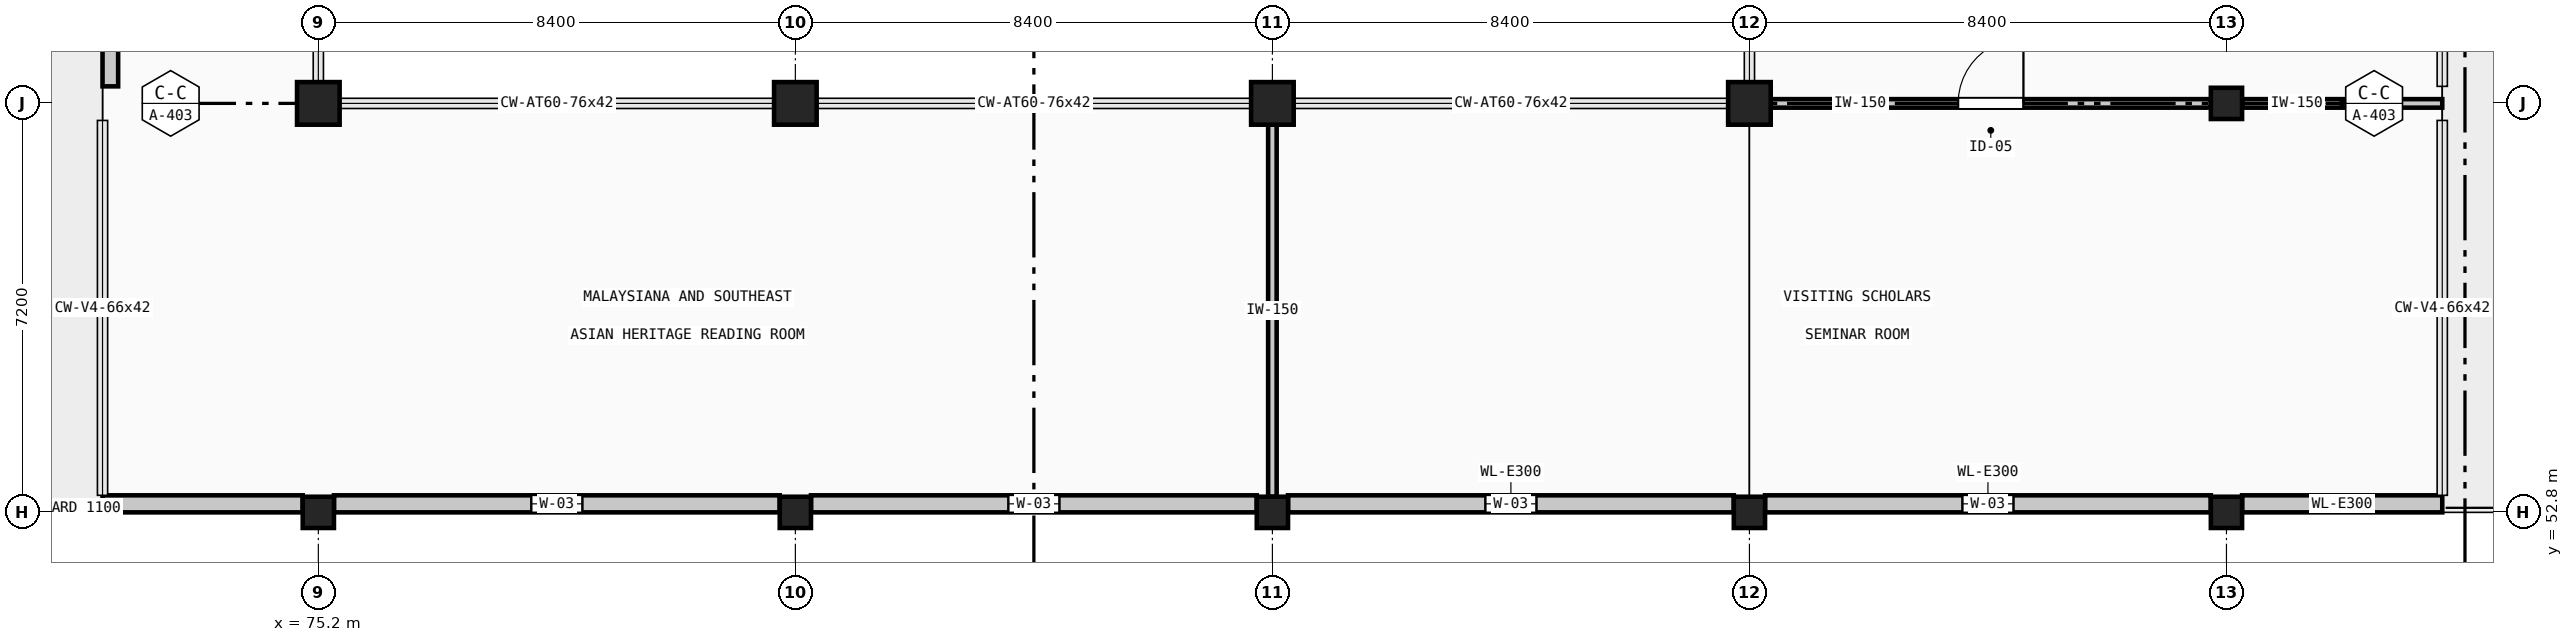
"""IFC4 building model, lengths in metres.
Left out: names, types, materials, properties, quantities, classifications, styles, units other than length and angle.
Written with IfcOpenShell. Run it as: python <this file> out.ifc"""

import sys

from ifc_helpers import new_model, si_unit, direction, frame, frame_2d, origin, origin_2d, place, context, subcontext, project, spatial, rectangle, circle, extrude, element, fill, save


model = new_model("IFC4")
c1 = context("Model", 3, precision=1e-05, world=origin(), true_north=direction((0.0, 1.0)))
c2 = subcontext(c1, "Body", "Model", "MODEL_VIEW")
j1 = project(units=[si_unit("LENGTHUNIT", "METRE"), si_unit("PLANEANGLEUNIT", "RADIAN")], contexts=[c1])
p1 = place(None, origin())
s1 = spatial("IfcSite", under=j1, at=p1, CompositionType="ELEMENT")
p2 = place(p1, origin())
s2 = spatial("IfcBuilding", under=s1, at=p2, CompositionType="ELEMENT")
p3 = place(p2, frame((0.0, 0.0, 23.36)))
s3 = spatial("IfcBuildingStorey", under=s2, at=p3, CompositionType="ELEMENT", Elevation=23.36)
p4 = place(p3, frame((75.2, 52.8, 0.0), z_axis=(0.0, 0.0, 1.0), x_axis=(1.0, 0.0, 0.0)))
e1 = element("IfcColumn", 1, at=p4, inside=s3, PredefinedType="COLUMN", context=c2, shape_type="SweptSolid", body=[
    extrude(rectangle(XDim=0.55, YDim=0.55, at=origin_2d()), origin(), (0.0, 0.0, 1.0), 4.48),
])
p5 = place(p3, frame((75.2, 60.0, 0.0), z_axis=(0.0, 0.0, 1.0), x_axis=(1.0, 0.0, 0.0)))
e2 = element("IfcColumn", 2, at=p5, inside=s3, PredefinedType="COLUMN", context=c2, shape_type="SweptSolid", body=[
    extrude(circle(Radius=0.375, at=origin_2d()), origin(), (0.0, 0.0, 1.0), 4.48),
])
p6 = place(p3, frame((83.6, 52.8, 0.0), z_axis=(0.0, 0.0, 1.0), x_axis=(1.0, 0.0, 0.0)))
e3 = element("IfcColumn", 3, at=p6, inside=s3, PredefinedType="COLUMN", context=c2, shape_type="SweptSolid", body=[
    extrude(rectangle(XDim=0.55, YDim=0.55, at=origin_2d()), origin(), (0.0, 0.0, 1.0), 4.48),
])
p7 = place(p3, frame((83.6, 60.0, 0.0), z_axis=(0.0, 0.0, 1.0), x_axis=(1.0, 0.0, 0.0)))
e4 = element("IfcColumn", 4, at=p7, inside=s3, PredefinedType="COLUMN", context=c2, shape_type="SweptSolid", body=[
    extrude(circle(Radius=0.375, at=origin_2d()), origin(), (0.0, 0.0, 1.0), 4.48),
])
p8 = place(p3, frame((92.0, 52.8, 0.0), z_axis=(0.0, 0.0, 1.0), x_axis=(1.0, 0.0, 0.0)))
e5 = element("IfcColumn", 5, at=p8, inside=s3, PredefinedType="COLUMN", context=c2, shape_type="SweptSolid", body=[
    extrude(rectangle(XDim=0.55, YDim=0.55, at=origin_2d()), origin(), (0.0, 0.0, 1.0), 4.48),
])
p9 = place(p3, frame((92.0, 60.0, 0.0), z_axis=(0.0, 0.0, 1.0), x_axis=(1.0, 0.0, 0.0)))
e6 = element("IfcColumn", 6, at=p9, inside=s3, PredefinedType="COLUMN", context=c2, shape_type="SweptSolid", body=[
    extrude(circle(Radius=0.375, at=origin_2d()), origin(), (0.0, 0.0, 1.0), 4.48),
])
p10 = place(p3, frame((100.4, 52.8, 0.0), z_axis=(0.0, 0.0, 1.0), x_axis=(1.0, 0.0, 0.0)))
e7 = element("IfcColumn", 7, at=p10, inside=s3, PredefinedType="COLUMN", context=c2, shape_type="SweptSolid", body=[
    extrude(rectangle(XDim=0.55, YDim=0.55, at=origin_2d()), origin(), (0.0, 0.0, 1.0), 4.48),
])
p11 = place(p3, frame((100.4, 60.0, 0.0), z_axis=(0.0, 0.0, 1.0), x_axis=(1.0, 0.0, 0.0)))
e8 = element("IfcColumn", 8, at=p11, inside=s3, PredefinedType="COLUMN", context=c2, shape_type="SweptSolid", body=[
    extrude(circle(Radius=0.375, at=origin_2d()), origin(), (0.0, 0.0, 1.0), 4.48),
])
for number, where, z_axis, x_axis in (
    (9, (108.8, 52.8, 0.0), (0.0, 0.0, 1.0), (1.0, 0.0, 0.0)),
    (10, (108.8, 60.0, 0.0), (0.0, 0.0, 1.0), (1.0, 0.0, 0.0)),
):
    element("IfcColumn", number, at=place(p3, frame(where, z_axis=z_axis, x_axis=x_axis)), inside=s3, PredefinedType="COLUMN", context=c2, shape_type="SweptSolid", body=[
        extrude(rectangle(XDim=0.55, YDim=0.55, at=origin_2d()), origin(), (0.0, 0.0, 1.0), 4.48),
    ])
p12 = place(p3, frame((112.6, 52.95, 0.0), z_axis=(0.0, 0.0, 1.0), x_axis=(-1.0, 0.0, 0.0)))
e11 = element("IfcWall", 11, at=p12, inside=s3, PredefinedType="SOLIDWALL", context=c2, shape_type="SweptSolid", body=[
    extrude(rectangle(XDim=3.525, YDim=0.3, at=frame_2d((1.763, 0.0))), origin(), (0.0, 0.0, 1.0), 4.255),
])
p13 = place(p3, frame((108.525, 52.95, 0.0), z_axis=(0.0, 0.0, 1.0), x_axis=(-1.0, 0.0, 0.0)))
e12 = element("IfcWall", 12, at=p13, inside=s3, PredefinedType="SOLIDWALL", context=c2, shape_type="SweptSolid", body=[
    extrude(rectangle(XDim=7.85, YDim=0.3, at=frame_2d((3.925, 0.0))), origin(), (0.0, 0.0, 1.0), 4.255),
])
p14 = place(p13, frame((3.475, 0.0, 0.9)))
e13 = element("IfcOpeningElement", 13, at=p14, cuts=e12, PredefinedType="OPENING", context=c2, shape_type="SweptSolid", body=[
    extrude(rectangle(XDim=0.9, YDim=2.1, at=frame_2d((0.45, 1.05))), frame((0.0, 0.16, 0.0), z_axis=(0.0, -1.0, 0.0), x_axis=(1.0, 0.0, 0.0)), (0.0, 0.0, 1.0), 0.32),
])
p15 = place(p3, frame((100.125, 52.95, 0.0), z_axis=(0.0, 0.0, 1.0), x_axis=(-1.0, 0.0, 0.0)))
e14 = element("IfcWall", 14, at=p15, inside=s3, PredefinedType="SOLIDWALL", context=c2, shape_type="SweptSolid", body=[
    extrude(rectangle(XDim=7.85, YDim=0.3, at=frame_2d((3.925, 0.0))), origin(), (0.0, 0.0, 1.0), 4.255),
])
p16 = place(p15, frame((3.475, 0.0, 0.9)))
e15 = element("IfcOpeningElement", 15, at=p16, cuts=e14, PredefinedType="OPENING", context=c2, shape_type="SweptSolid", body=[
    extrude(rectangle(XDim=0.9, YDim=2.1, at=frame_2d((0.45, 1.05))), frame((0.0, 0.16, 0.0), z_axis=(0.0, -1.0, 0.0), x_axis=(1.0, 0.0, 0.0)), (0.0, 0.0, 1.0), 0.32),
])
p17 = place(p3, frame((91.725, 52.95, 0.0), z_axis=(0.0, 0.0, 1.0), x_axis=(-1.0, 0.0, 0.0)))
e16 = element("IfcWall", 16, at=p17, inside=s3, PredefinedType="SOLIDWALL", context=c2, shape_type="SweptSolid", body=[
    extrude(rectangle(XDim=7.85, YDim=0.3, at=frame_2d((3.925, 0.0))), origin(), (0.0, 0.0, 1.0), 4.255),
])
p18 = place(p17, frame((3.475, 0.0, 0.9)))
e17 = element("IfcOpeningElement", 17, at=p18, cuts=e16, PredefinedType="OPENING", context=c2, shape_type="SweptSolid", body=[
    extrude(rectangle(XDim=0.9, YDim=2.1, at=frame_2d((0.45, 1.05))), frame((0.0, 0.16, 0.0), z_axis=(0.0, -1.0, 0.0), x_axis=(1.0, 0.0, 0.0)), (0.0, 0.0, 1.0), 0.32),
])
p19 = place(p3, frame((83.325, 52.95, 0.0), z_axis=(0.0, 0.0, 1.0), x_axis=(-1.0, 0.0, 0.0)))
e18 = element("IfcWall", 18, at=p19, inside=s3, PredefinedType="SOLIDWALL", context=c2, shape_type="SweptSolid", body=[
    extrude(rectangle(XDim=7.85, YDim=0.3, at=frame_2d((3.925, 0.0))), origin(), (0.0, 0.0, 1.0), 4.255),
])
p20 = place(p19, frame((3.475, 0.0, 0.9)))
e19 = element("IfcOpeningElement", 19, at=p20, cuts=e18, PredefinedType="OPENING", context=c2, shape_type="SweptSolid", body=[
    extrude(rectangle(XDim=0.9, YDim=2.1, at=frame_2d((0.45, 1.05))), frame((0.0, 0.16, 0.0), z_axis=(0.0, -1.0, 0.0), x_axis=(1.0, 0.0, 0.0)), (0.0, 0.0, 1.0), 0.32),
])
p21 = place(p3, frame((74.925, 52.95, 0.0), z_axis=(0.0, 0.0, 1.0), x_axis=(-1.0, 0.0, 0.0)))
e20 = element("IfcWall", 20, at=p21, inside=s3, PredefinedType="SOLIDWALL", context=c2, shape_type="SweptSolid", body=[
    extrude(rectangle(XDim=3.525, YDim=0.3, at=frame_2d((1.763, 0.0))), origin(), (0.0, 0.0, 1.0), 4.255),
])
p22 = place(p3, frame((71.538, 60.3, 0.0), z_axis=(0.0, 0.0, 1.0), x_axis=(0.0, 1.0, 0.0)))
e21 = element("IfcWall", 21, at=p22, inside=s3, PredefinedType="SOLIDWALL", context=c2, shape_type="SweptSolid", body=[
    extrude(rectangle(XDim=6.6, YDim=0.275, at=frame_2d((3.3, 0.0))), origin(), (0.0, 0.0, 1.0), 4.255),
])
p23 = place(p22, frame((2.4, 0.0, 0.0)))
e22 = element("IfcOpeningElement", 22, at=p23, cuts=e21, PredefinedType="OPENING", context=c2, shape_type="SweptSolid", body=[
    extrude(rectangle(XDim=1.8, YDim=2.25, at=frame_2d((0.9, 1.125))), frame((0.0, 0.147, 0.0), z_axis=(0.0, -1.0, 0.0), x_axis=(1.0, 0.0, 0.0)), (0.0, 0.0, 1.0), 0.295),
])
p24 = place(p3, frame((100.775, 60.0, 0.0), z_axis=(0.0, 0.0, 1.0), x_axis=(1.0, 0.0, 0.0)))
e23 = element("IfcWall", 23, at=p24, inside=s3, PredefinedType="PARTITIONING", context=c2, shape_type="SweptSolid", body=[
    extrude(rectangle(XDim=7.75, YDim=0.15, at=frame_2d((3.875, 0.0))), origin(), (0.0, 0.0, 1.0), 4.255),
])
p25 = place(p24, frame((3.3, 0.0, 0.0)))
e24 = element("IfcOpeningElement", 24, at=p25, cuts=e23, PredefinedType="OPENING", context=c2, shape_type="SweptSolid", body=[
    extrude(rectangle(XDim=1.15, YDim=2.2, at=frame_2d((0.575, 1.1))), frame((0.0, 0.085, 0.0), z_axis=(0.0, -1.0, 0.0), x_axis=(1.0, 0.0, 0.0)), (0.0, 0.0, 1.0), 0.17),
])
p26 = place(p3, frame((109.075, 60.0, 0.0), z_axis=(0.0, 0.0, 1.0), x_axis=(1.0, 0.0, 0.0)))
e25 = element("IfcWall", 25, at=p26, inside=s3, PredefinedType="PARTITIONING", context=c2, shape_type="SweptSolid", body=[
    extrude(rectangle(XDim=3.525, YDim=0.15, at=frame_2d((1.763, 0.0))), origin(), (0.0, 0.0, 1.0), 4.255),
])
p27 = place(p3, frame((92.0, 53.075, 0.0), z_axis=(0.0, 0.0, 1.0), x_axis=(0.0, 1.0, 0.0)))
e26 = element("IfcWall", 26, at=p27, inside=s3, PredefinedType="PARTITIONING", context=c2, shape_type="SweptSolid", body=[
    extrude(rectangle(XDim=6.55, YDim=0.15, at=frame_2d((3.275, 0.0))), origin(), (0.0, 0.0, 1.0), 4.255),
])
p28 = place(p14, origin())
e27 = element("IfcWindow", 27, at=p28, inside=s3, PartitioningType="SINGLE_PANEL", PredefinedType="WINDOW", context=c2, shape_type="SweptSolid", body=[
    extrude(rectangle(XDim=0.9, YDim=2.1, at=frame_2d((0.45, 1.05))), frame((0.0, 0.03, 0.0), z_axis=(0.0, -1.0, 0.0), x_axis=(1.0, 0.0, 0.0)), (0.0, 0.0, 1.0), 0.06),
])
fill(e13, e27)
p29 = place(p16, origin())
e28 = element("IfcWindow", 28, at=p29, inside=s3, PartitioningType="SINGLE_PANEL", PredefinedType="WINDOW", context=c2, shape_type="SweptSolid", body=[
    extrude(rectangle(XDim=0.9, YDim=2.1, at=frame_2d((0.45, 1.05))), frame((0.0, 0.03, 0.0), z_axis=(0.0, -1.0, 0.0), x_axis=(1.0, 0.0, 0.0)), (0.0, 0.0, 1.0), 0.06),
])
fill(e15, e28)
p30 = place(p18, origin())
e29 = element("IfcWindow", 29, at=p30, inside=s3, PartitioningType="SINGLE_PANEL", PredefinedType="WINDOW", context=c2, shape_type="SweptSolid", body=[
    extrude(rectangle(XDim=0.9, YDim=2.1, at=frame_2d((0.45, 1.05))), frame((0.0, 0.03, 0.0), z_axis=(0.0, -1.0, 0.0), x_axis=(1.0, 0.0, 0.0)), (0.0, 0.0, 1.0), 0.06),
])
fill(e17, e29)
p31 = place(p20, origin())
e30 = element("IfcWindow", 30, at=p31, inside=s3, PartitioningType="SINGLE_PANEL", PredefinedType="WINDOW", context=c2, shape_type="SweptSolid", body=[
    extrude(rectangle(XDim=0.9, YDim=2.1, at=frame_2d((0.45, 1.05))), frame((0.0, 0.03, 0.0), z_axis=(0.0, -1.0, 0.0), x_axis=(1.0, 0.0, 0.0)), (0.0, 0.0, 1.0), 0.06),
])
fill(e19, e30)
p32 = place(p25, origin())
e31 = element("IfcDoor", 31, at=p32, inside=s3, OperationType="SINGLE_SWING_RIGHT", PredefinedType="DOOR", context=c2, shape_type="SweptSolid", body=[
    extrude(rectangle(XDim=1.15, YDim=2.2, at=frame_2d((0.575, 1.1))), frame((0.0, 0.025, 0.0), z_axis=(0.0, -1.0, 0.0), x_axis=(1.0, 0.0, 0.0)), (0.0, 0.0, 1.0), 0.05),
])
fill(e24, e31)
save(model, sys.argv[1])
